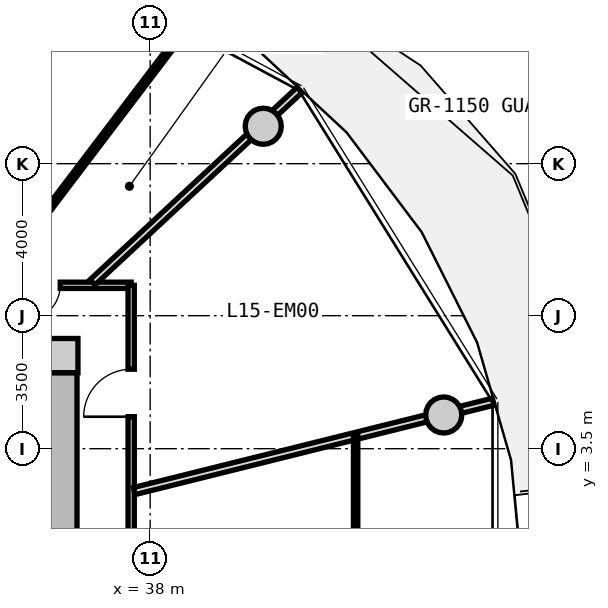
"""IFC4 building model, lengths in metres.
Left out: names, types, materials, properties, quantities, classifications, styles, units other than length and angle.
Written with IfcOpenShell. Run it as: python <this file> out.ifc"""

import sys

from ifc_helpers import new_model, si_unit, direction, frame, frame_2d, origin, origin_2d, place, context, subcontext, project, spatial, rectangle, circle, extrude, source, transform, mapped, element, fill, save


model = new_model("IFC4")
c1 = context("Model", 3, precision=1e-05, world=origin(), true_north=direction((0.0, 1.0)))
c2 = subcontext(c1, "Body", "Model", "MODEL_VIEW")
j1 = project(units=[si_unit("LENGTHUNIT", "METRE"), si_unit("PLANEANGLEUNIT", "RADIAN")], contexts=[c1])
p1 = place(None, origin())
s1 = spatial("IfcSite", under=j1, at=p1, CompositionType="ELEMENT")
p2 = place(p1, origin())
s2 = spatial("IfcBuilding", under=s1, at=p2, CompositionType="ELEMENT")
p3 = place(p2, frame((0.0, 0.0, 52.1)))
s3 = spatial("IfcBuildingStorey", under=s2, at=p3, CompositionType="ELEMENT", Elevation=52.1)
m1 = source(origin(), c2, "Body", "SweptSolid", [
    extrude(rectangle(XDim=0.9, YDim=0.9, at=origin_2d()), origin(), (0.0, 0.0, 1.0), 3.05),
])
p4 = place(p3, frame((35.65, 5.95, 0.0), z_axis=(0.0, 0.0, 1.0), x_axis=(1.0, 0.0, 0.0)))
e1 = element("IfcColumn", 1, at=p4, inside=s3, PredefinedType="COLUMN", context=c2, shape_type="MappedRepresentation", body=[
    mapped(m1, transform((0.0, 0.0, 0.0), x_axis=(1.0, 0.0, 0.0), y_axis=(0.0, 1.0, 0.0), z_axis=(0.0, 0.0, 1.0), scale=1.0)),
])
m2 = source(origin(), c2, "Body", "SweptSolid", [
    extrude(rectangle(XDim=11.0, YDim=0.85, at=frame_2d((5.5, 0.0))), origin(), (0.0, 0.0, 1.0), 2.79),
])
p5 = place(p3, frame((35.65, 5.5, 0.0), z_axis=(0.0, 0.0, 1.0), x_axis=(0.0, -1.0, 0.0)))
e2 = element("IfcWall", 2, at=p5, inside=s3, PredefinedType="SHEAR", context=c2, shape_type="MappedRepresentation", body=[
    mapped(m2, transform((0.0, 0.0, 0.0), x_axis=(1.0, 0.0, 0.0), y_axis=(0.0, 1.0, 0.0), z_axis=(0.0, 0.0, 1.0), scale=1.0)),
])
p6 = place(p5, frame((5.65, 0.0, 0.0)))
e3 = element("IfcOpeningElement", 3, at=p6, cuts=e2, PredefinedType="OPENING", context=c2, shape_type="SweptSolid", body=[
    extrude(rectangle(XDim=1.2, YDim=2.15, at=frame_2d((0.6, 1.075))), frame((0.0, 0.435, 0.0), z_axis=(0.0, -1.0, 0.0), x_axis=(1.0, 0.0, 0.0)), (0.0, 0.0, 1.0), 0.87),
])
m3 = source(origin(), c2, "Body", "SweptSolid", [
    extrude(circle(Radius=0.475, at=origin_2d()), origin(), (0.0, 0.0, 1.0), 3.05),
])
for number, where, z_axis, x_axis in (
    (4, (45.725, 4.387, 0.0), (0.0, 0.0, 1.0), (1.0, 0.0, 0.0)),
    (5, (40.975, 11.985, 0.0), (0.0, 0.0, 1.0), (1.0, 0.0, 0.0)),
):
    element("IfcColumn", number, at=place(p3, frame(where, z_axis=z_axis, x_axis=x_axis)), inside=s3, PredefinedType="COLUMN", context=c2, shape_type="MappedRepresentation", body=[
        mapped(m3, transform((0.0, 0.0, 0.0), x_axis=(1.0, 0.0, 0.0), y_axis=(0.0, 1.0, 0.0), z_axis=(0.0, 0.0, 1.0), scale=1.0)),
    ])
m4 = source(origin(), c2, "Body", "SweptSolid", [
    extrude(rectangle(XDim=19.0, YDim=0.165, at=frame_2d((9.5, 0.0))), origin(), (0.0, 0.0, 1.0), 2.775),
])
p7 = place(p3, frame((18.5, 7.8, 0.0), z_axis=(0.0, 0.0, 1.0), x_axis=(1.0, 0.0, 0.0)))
e6 = element("IfcWall", 6, at=p7, inside=s3, PredefinedType="PARTITIONING", context=c2, shape_type="MappedRepresentation", body=[
    mapped(m4, transform((0.0, 0.0, 0.0), x_axis=(1.0, 0.0, 0.0), y_axis=(0.0, 1.0, 0.0), z_axis=(0.0, 0.0, 1.0), scale=1.0)),
])
p8 = place(p7, frame((16.214, 0.0, 0.0)))
e7 = element("IfcOpeningElement", 7, at=p8, cuts=e6, PredefinedType="OPENING", context=c2, shape_type="SweptSolid", body=[
    extrude(rectangle(XDim=0.92, YDim=2.1, at=frame_2d((0.46, 1.05))), frame((0.0, 0.093, 0.0), z_axis=(0.0, -1.0, 0.0), x_axis=(1.0, 0.0, 0.0)), (0.0, 0.0, 1.0), 0.185),
])
p9 = place(p7, frame((13.063, 0.0, 0.0)))
e8 = element("IfcOpeningElement", 8, at=p9, cuts=e6, PredefinedType="OPENING", context=c2, shape_type="SweptSolid", body=[
    extrude(rectangle(XDim=0.92, YDim=2.1, at=frame_2d((0.46, 1.05))), frame((0.0, 0.093, 0.0), z_axis=(0.0, -1.0, 0.0), x_axis=(1.0, 0.0, 0.0)), (0.0, 0.0, 1.0), 0.185),
])
p10 = place(p7, frame((8.875, 0.0, 0.0)))
e9 = element("IfcOpeningElement", 9, at=p10, cuts=e6, PredefinedType="OPENING", context=c2, shape_type="SweptSolid", body=[
    extrude(rectangle(XDim=1.25, YDim=2.2, at=frame_2d((0.625, 1.1))), frame((0.0, 0.093, 0.0), z_axis=(0.0, -1.0, 0.0), x_axis=(1.0, 0.0, 0.0)), (0.0, 0.0, 1.0), 0.185),
])
p11 = place(p7, frame((3.506, 0.0, 0.0)))
e10 = element("IfcOpeningElement", 10, at=p11, cuts=e6, PredefinedType="OPENING", context=c2, shape_type="SweptSolid", body=[
    extrude(rectangle(XDim=1.25, YDim=2.2, at=frame_2d((0.625, 1.1))), frame((0.0, 0.093, 0.0), z_axis=(0.0, -1.0, 0.0), x_axis=(1.0, 0.0, 0.0)), (0.0, 0.0, 1.0), 0.185),
])
m5 = source(origin(), c2, "Body", "SweptSolid", [
    extrude(rectangle(XDim=15.6, YDim=0.165, at=frame_2d((7.8, 0.0))), origin(), (0.0, 0.0, 1.0), 2.775),
])
p12 = place(p3, frame((37.5, 7.8, 0.0), z_axis=(0.0, 0.0, 1.0), x_axis=(0.0, -1.0, 0.0)))
e11 = element("IfcWall", 11, at=p12, inside=s3, PredefinedType="PARTITIONING", context=c2, shape_type="MappedRepresentation", body=[
    mapped(m5, transform((0.0, 0.0, 0.0), x_axis=(1.0, 0.0, 0.0), y_axis=(0.0, 1.0, 0.0), z_axis=(0.0, 0.0, 1.0), scale=1.0)),
])
p13 = place(p12, frame((8.835, 0.0, 0.0)))
e12 = element("IfcOpeningElement", 12, at=p13, cuts=e11, PredefinedType="OPENING", context=c2, shape_type="SweptSolid", body=[
    extrude(rectangle(XDim=1.05, YDim=2.15, at=frame_2d((0.525, 1.075))), frame((0.0, 0.093, 0.0), z_axis=(0.0, -1.0, 0.0), x_axis=(1.0, 0.0, 0.0)), (0.0, 0.0, 1.0), 0.185),
])
p14 = place(p12, frame((2.208, 0.0, 0.0)))
e13 = element("IfcOpeningElement", 13, at=p14, cuts=e11, PredefinedType="OPENING", context=c2, shape_type="SweptSolid", body=[
    extrude(rectangle(XDim=1.25, YDim=2.2, at=frame_2d((0.625, 1.1))), frame((0.0, 0.093, 0.0), z_axis=(0.0, -1.0, 0.0), x_axis=(1.0, 0.0, 0.0)), (0.0, 0.0, 1.0), 0.185),
])
m6 = source(origin(), c2, "Body", "SweptSolid", [
    extrude(rectangle(XDim=9.737, YDim=0.19, at=frame_2d((4.869, 0.0))), origin(), (0.0, 0.0, 1.0), 2.225),
])
p15 = place(p3, frame((37.58, 2.385, 0.0), z_axis=(0.0, 0.0, 1.0), x_axis=(0.970392716238, 0.241532557375, 0.0)))
e14 = element("IfcWall", 14, at=p15, inside=s3, PredefinedType="PARTITIONING", context=c2, shape_type="MappedRepresentation", body=[
    mapped(m6, transform((0.0, 0.0, 0.0), x_axis=(1.0, 0.0, 0.0), y_axis=(0.0, 1.0, 0.0), z_axis=(0.0, 0.0, 1.0), scale=1.0)),
])
m7 = source(origin(), c2, "Body", "SweptSolid", [
    extrude(rectangle(XDim=7.709, YDim=0.115, at=frame_2d((3.855, 0.0))), origin(), (0.0, 0.0, 1.0), 2.775),
])
p16 = place(p3, frame((43.406, -3.855, 0.0), z_axis=(0.0, 0.0, 1.0), x_axis=(0.0, 1.0, 0.0)))
e15 = element("IfcWall", 15, at=p16, inside=s3, PredefinedType="PARTITIONING", context=c2, shape_type="MappedRepresentation", body=[
    mapped(m7, transform((0.0, 0.0, 0.0), x_axis=(1.0, 0.0, 0.0), y_axis=(0.0, 1.0, 0.0), z_axis=(0.0, 0.0, 1.0), scale=1.0)),
])
p17 = place(p16, frame((3.38, 0.0, 0.0)))
e16 = element("IfcOpeningElement", 16, at=p17, cuts=e15, PredefinedType="OPENING", context=c2, shape_type="SweptSolid", body=[
    extrude(rectangle(XDim=0.95, YDim=2.1, at=frame_2d((0.475, 1.05))), frame((0.0, 0.067, 0.0), z_axis=(0.0, -1.0, 0.0), x_axis=(1.0, 0.0, 0.0)), (0.0, 0.0, 1.0), 0.135),
])
m8 = source(origin(), c2, "Body", "SweptSolid", [
    extrude(rectangle(XDim=7.435, YDim=0.19, at=frame_2d((3.717, 0.0))), origin(), (0.0, 0.0, 1.0), 2.225),
])
p18 = place(p3, frame((36.483, 7.88, 0.0), z_axis=(0.0, 0.0, 1.0), x_axis=(0.732651956848, 0.680603489652, 0.0)))
e17 = element("IfcWall", 17, at=p18, inside=s3, PredefinedType="PARTITIONING", context=c2, shape_type="MappedRepresentation", body=[
    mapped(m8, transform((0.0, 0.0, 0.0), x_axis=(1.0, 0.0, 0.0), y_axis=(0.0, 1.0, 0.0), z_axis=(0.0, 0.0, 1.0), scale=1.0)),
])
m9 = source(origin(), c2, "Body", "SweptSolid", [
    extrude(rectangle(XDim=8.436, YDim=0.14, at=frame_2d((4.218, 0.0))), origin(), (0.0, 0.0, 1.0), 2.775),
])
p19 = place(p3, frame((33.828, 7.83, 0.0), z_axis=(0.0, 0.0, 1.0), x_axis=(0.604486552388, 0.796615345058, 0.0)))
e18 = element("IfcWall", 18, at=p19, inside=s3, PredefinedType="PARTITIONING", context=c2, shape_type="MappedRepresentation", body=[
    mapped(m9, transform((0.0, 0.0, 0.0), x_axis=(1.0, 0.0, 0.0), y_axis=(0.0, 1.0, 0.0), z_axis=(0.0, 0.0, 1.0), scale=1.0)),
])
m10 = source(origin(), c2, "Body", "SweptSolid", [
    extrude(rectangle(XDim=1.25, YDim=2.2, at=frame_2d((0.625, 1.1))), frame((0.0, 0.025, 0.0), z_axis=(0.0, -1.0, 0.0), x_axis=(1.0, 0.0, 0.0)), (0.0, 0.0, 1.0), 0.05),
])
p20 = place(p14, frame((1.25, 0.0, 0.0), z_axis=(0.0, 0.0, 1.0), x_axis=(-1.0, 0.0, 0.0)))
e19 = element("IfcDoor", 19, at=p20, inside=s3, OperationType="SINGLE_SWING_LEFT", PredefinedType="DOOR", context=c2, shape_type="MappedRepresentation", body=[
    mapped(m10, transform((0.0, 0.0, 0.0), x_axis=(1.0, 0.0, 0.0), y_axis=(0.0, 1.0, 0.0), z_axis=(0.0, 0.0, 1.0), scale=1.0)),
])
fill(e13, e19)
m11 = source(origin(), c2, "Body", "SweptSolid", [
    extrude(rectangle(XDim=0.92, YDim=2.1, at=frame_2d((0.46, 1.05))), frame((0.0, 0.025, 0.0), z_axis=(0.0, -1.0, 0.0), x_axis=(1.0, 0.0, 0.0)), (0.0, 0.0, 1.0), 0.05),
])
p21 = place(p8, frame((0.92, 0.0, 0.0), z_axis=(0.0, 0.0, 1.0), x_axis=(-1.0, 0.0, 0.0)))
e20 = element("IfcDoor", 20, at=p21, inside=s3, OperationType="SINGLE_SWING_RIGHT", PredefinedType="DOOR", context=c2, shape_type="MappedRepresentation", body=[
    mapped(m11, transform((0.0, 0.0, 0.0), x_axis=(1.0, 0.0, 0.0), y_axis=(0.0, 1.0, 0.0), z_axis=(0.0, 0.0, 1.0), scale=1.0)),
])
fill(e7, e20)
save(model, sys.argv[1])
